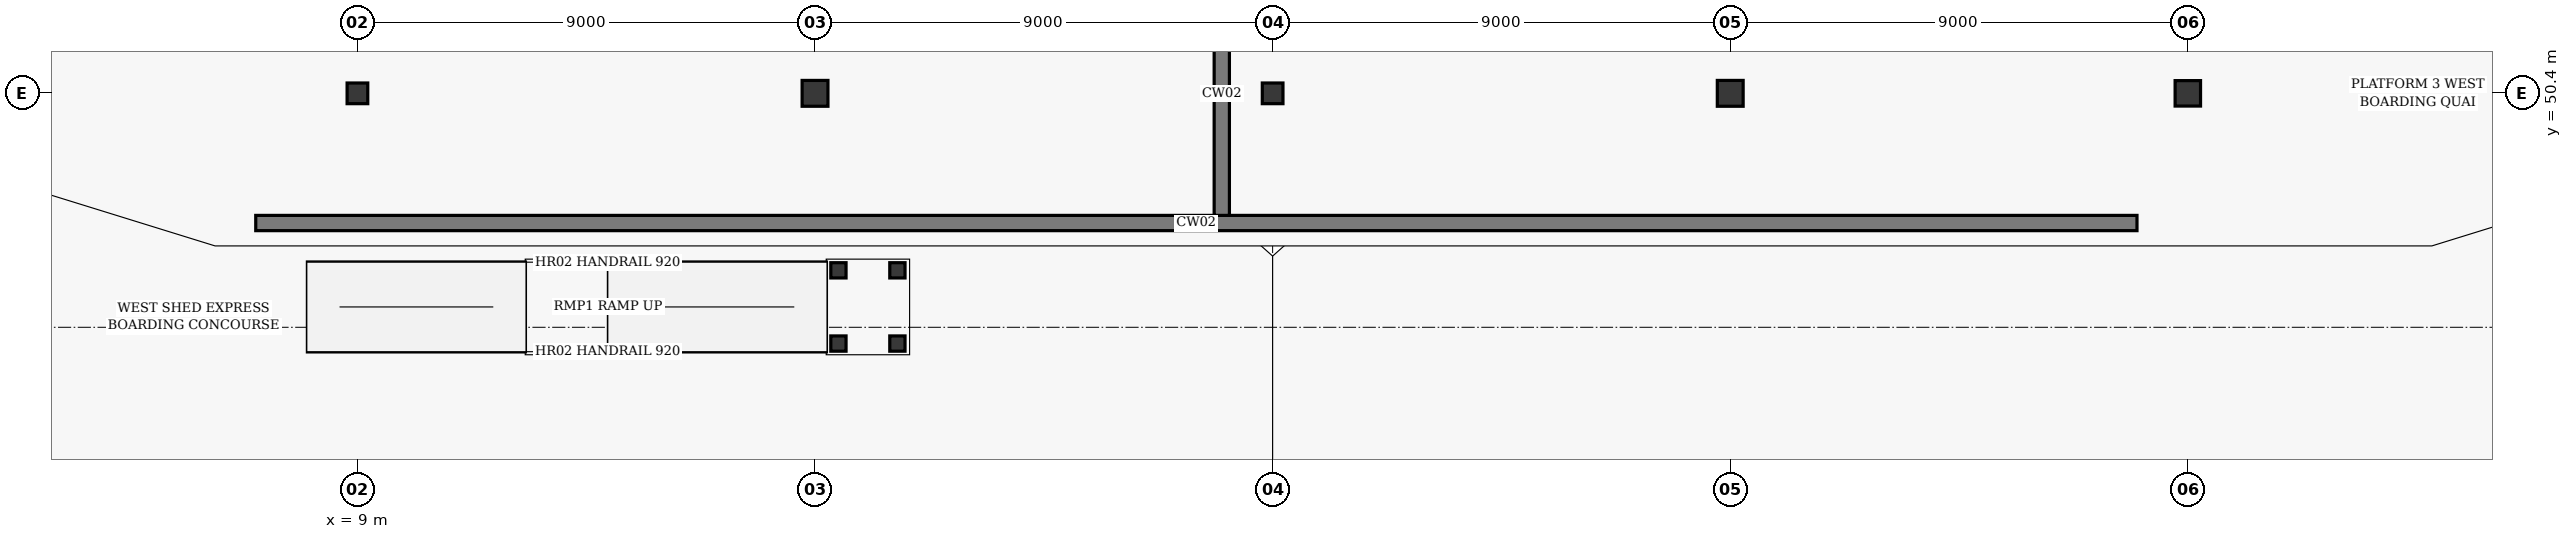
"""IFC4 building model, lengths in metres.
Left out: names, types, materials, properties, quantities, classifications, styles, units other than length and angle.
Written with IfcOpenShell. Run it as: python <this file> out.ifc"""

import sys

from ifc_helpers import new_model, si_unit, direction, frame, frame_2d, origin, origin_2d, place, context, subcontext, project, spatial, rectangle, hollow_rectangle, hollow_circle, i_section, extrude, element, save


model = new_model("IFC4")
c1 = context("Model", 3, precision=1e-05, world=origin(), true_north=direction((0.0, 1.0)))
c2 = subcontext(c1, "Body", "Model", "MODEL_VIEW")
j1 = project(units=[si_unit("LENGTHUNIT", "METRE"), si_unit("PLANEANGLEUNIT", "RADIAN")], contexts=[c1])
p1 = place(None, origin())
s1 = spatial("IfcSite", under=j1, at=p1, CompositionType="ELEMENT")
p2 = place(p1, origin())
s2 = spatial("IfcBuilding", under=s1, at=p2, CompositionType="ELEMENT")
p3 = place(p2, origin())
s3 = spatial("IfcBuildingStorey", under=s2, at=p3, CompositionType="ELEMENT", Elevation=0.0)
p4 = place(p3, frame((9.0, 50.4, 0.0), z_axis=(0.0, 0.0, 1.0), x_axis=(1.0, 0.0, 0.0)))
e1 = element("IfcColumn", 1, at=p4, inside=s3, PredefinedType="COLUMN", context=c2, shape_type="SweptSolid", body=[
    extrude(hollow_circle(Radius=0.203, WallThickness=0.014, at=origin_2d()), origin(), (0.0, 0.0, 1.0), 6.6),
])
p5 = place(p3, frame((18.0, 50.4, 0.0), z_axis=(0.0, 0.0, 1.0), x_axis=(1.0, 0.0, 0.0)))
e2 = element("IfcColumn", 2, at=p5, inside=s3, PredefinedType="COLUMN", context=c2, shape_type="SweptSolid", body=[
    extrude(hollow_circle(Radius=0.254, WallThickness=0.016, at=origin_2d()), origin(), (0.0, 0.0, 1.0), 6.6),
])
p6 = place(p3, frame((27.0, 50.4, 0.0), z_axis=(0.0, 0.0, 1.0), x_axis=(1.0, 0.0, 0.0)))
e3 = element("IfcColumn", 3, at=p6, inside=s3, PredefinedType="COLUMN", context=c2, shape_type="SweptSolid", body=[
    extrude(hollow_circle(Radius=0.203, WallThickness=0.014, at=origin_2d()), origin(), (0.0, 0.0, 1.0), 6.6),
])
p7 = place(p3, frame((36.0, 50.4, 0.0), z_axis=(0.0, 0.0, 1.0), x_axis=(1.0, 0.0, 0.0)))
e4 = element("IfcColumn", 4, at=p7, inside=s3, PredefinedType="COLUMN", context=c2, shape_type="SweptSolid", body=[
    extrude(hollow_circle(Radius=0.254, WallThickness=0.016, at=origin_2d()), origin(), (0.0, 0.0, 1.0), 6.6),
])
p8 = place(p3, frame((45.0, 50.4, 0.0), z_axis=(0.0, 0.0, 1.0), x_axis=(1.0, 0.0, 0.0)))
e5 = element("IfcColumn", 5, at=p8, inside=s3, PredefinedType="COLUMN", context=c2, shape_type="SweptSolid", body=[
    extrude(hollow_rectangle(XDim=0.5, YDim=0.5, WallThickness=0.02, at=origin_2d()), origin(), (0.0, 0.0, 1.0), 6.6),
])
p9 = place(p3, frame((7.0, 47.85, 0.0), z_axis=(0.0, 0.0, 1.0), x_axis=(1.0, 0.0, 0.0)))
e6 = element("IfcWall", 6, at=p9, inside=s3, PredefinedType="SOLIDWALL", context=c2, shape_type="SweptSolid", body=[
    extrude(rectangle(XDim=37.0, YDim=0.3, at=frame_2d((18.5, 0.0))), origin(), (0.0, 0.0, 1.0), 0.375),
])
p10 = place(p3, frame((26.0, 48.0, 0.0), z_axis=(0.0, 0.0, 1.0), x_axis=(0.0, 1.0, 0.0)))
e7 = element("IfcWall", 7, at=p10, inside=s3, PredefinedType="SOLIDWALL", context=c2, shape_type="SweptSolid", body=[
    extrude(rectangle(XDim=4.8, YDim=0.3, at=frame_2d((2.4, 0.0))), origin(), (0.0, 0.0, 1.0), 0.375),
])
for number, where, z_axis, x_axis in (
    (8, (18.46, 45.48, 0.0), (0.0, 0.0, 1.0), (1.0, 0.0, 0.0)),
    (9, (19.62, 45.48, 0.0), (0.0, 0.0, 1.0), (1.0, 0.0, 0.0)),
    (10, (18.46, 46.92, 0.0), (0.0, 0.0, 1.0), (1.0, 0.0, 0.0)),
    (11, (19.62, 46.92, 0.0), (0.0, 0.0, 1.0), (1.0, 0.0, 0.0)),
):
    element("IfcColumn", number, at=place(p3, frame(where, z_axis=z_axis, x_axis=x_axis)), inside=s3, PredefinedType="COLUMN", context=c2, shape_type="SweptSolid", body=[
        extrude(i_section(OverallWidth=0.3, OverallDepth=0.3, WebThickness=0.011, FlangeThickness=0.019, at=origin_2d()), origin(), (0.0, 0.0, 1.0), 0.56),
    ])
save(model, sys.argv[1])
